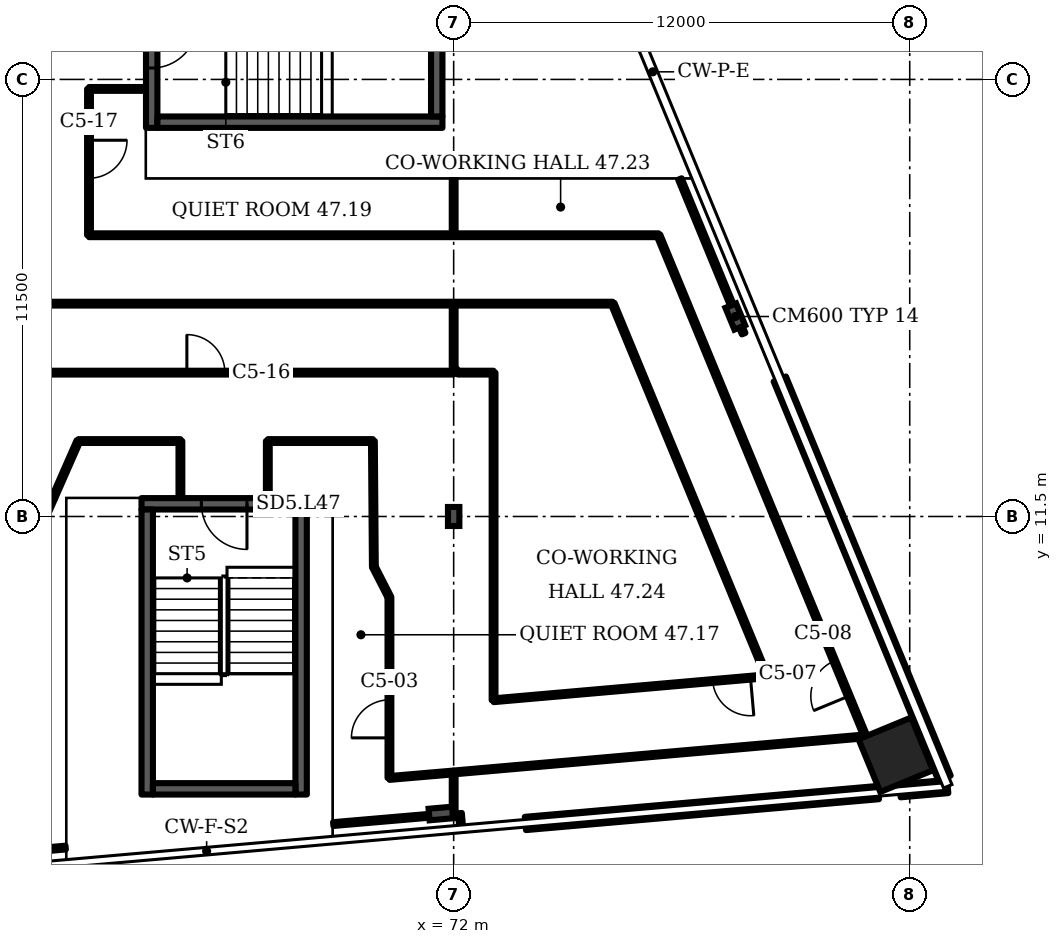
"""IFC4 building model, lengths in metres.
Left out: names, types, materials, properties, quantities, classifications, styles, units other than length and angle.
Written with IfcOpenShell. Run it as: python <this file> out.ifc"""

import sys

from ifc_helpers import new_model, si_unit, direction, frame, frame_2d, origin, origin_2d, place, context, subcontext, project, spatial, rectangle, i_section, extrude, element, fill, save


model = new_model("IFC4")
c1 = context("Model", 3, precision=1e-05, world=origin(), true_north=direction((0.0, 1.0)))
c2 = subcontext(c1, "Body", "Model", "MODEL_VIEW")
j1 = project(units=[si_unit("LENGTHUNIT", "METRE"), si_unit("PLANEANGLEUNIT", "RADIAN")], contexts=[c1])
p1 = place(None, origin())
s1 = spatial("IfcSite", under=j1, at=p1, CompositionType="ELEMENT")
p2 = place(p1, origin())
s2 = spatial("IfcBuilding", under=s1, at=p2, CompositionType="ELEMENT")
p3 = place(p2, frame((0.0, 0.0, 191.5)))
s3 = spatial("IfcBuildingStorey", under=s2, at=p3, CompositionType="ELEMENT", Elevation=191.5)
p4 = place(p3, frame((83.633, 5.231, 0.0), z_axis=(0.0, 0.0, 1.0), x_axis=(-0.381602, 0.924325, 0.0)))
e1 = element("IfcColumn", 1, at=p4, inside=s3, PredefinedType="COLUMN", context=c2, shape_type="SweptSolid", body=[
    extrude(rectangle(XDim=1.5, YDim=1.5, at=origin_2d()), origin(), (0.0, 0.0, 1.0), 3.6),
])
for number, where, z_axis, x_axis in (
    (2, (71.662, 3.685, 0.0), (0.0, 0.0, 1.0), (0.087, -0.996, 0.0)),
    (3, (79.41, 16.762, 0.0), (0.0, 0.0, 1.0), (0.924, 0.382, 0.0)),
):
    element("IfcColumn", number, at=place(p3, frame(where, z_axis=z_axis, x_axis=x_axis)), inside=s3, PredefinedType="COLUMN", context=c2, shape_type="SweptSolid", body=[
        extrude(i_section(OverallWidth=0.305, OverallDepth=0.62, WebThickness=0.021, FlangeThickness=0.04, FilletRadius=0.027, at=origin_2d()), origin(), (0.0, 0.0, 1.0), 3.6),
    ])
p5 = place(p3, frame((72.0, 11.5, 0.0), z_axis=(0.0, 0.0, 1.0), x_axis=(1.0, 0.0, 0.0)))
e4 = element("IfcColumn", 4, at=p5, inside=s3, PredefinedType="COLUMN", context=c2, shape_type="SweptSolid", body=[
    extrude(i_section(OverallWidth=0.3, OverallDepth=0.5, WebThickness=0.014, FlangeThickness=0.028, FilletRadius=0.027, at=origin_2d()), origin(), (0.0, 0.0, 1.0), 3.6),
])
p6 = place(p3, frame((73.887, 3.423, 0.0), z_axis=(0.0, 0.0, 1.0), x_axis=(0.996197, 0.087145, 0.0)))
e5 = element("IfcWall", 5, at=p6, inside=s3, PredefinedType="SOLIDWALL", context=c2, shape_type="SweptSolid", body=[
    extrude(rectangle(XDim=9.323, YDim=0.35, at=frame_2d((4.662, 0.0))), origin(), (0.0, 0.0, 1.0), 1.0),
])
p7 = place(p3, frame((83.745, 4.285, 0.0), z_axis=(0.0, 0.0, 1.0), x_axis=(0.996198, 0.087148, 0.0)))
e6 = element("IfcWall", 6, at=p7, inside=s3, PredefinedType="SOLIDWALL", context=c2, shape_type="SweptSolid", body=[
    extrude(rectangle(XDim=1.261, YDim=0.35, at=frame_2d((0.63, 0.0))), origin(), (0.0, 0.0, 1.0), 1.0),
])
p8 = place(p3, frame((84.916, 4.616, 0.0), z_axis=(0.0, 0.0, 1.0), x_axis=(-0.381598, 0.924328, 0.0)))
e7 = element("IfcWall", 7, at=p8, inside=s3, PredefinedType="SOLIDWALL", context=c2, shape_type="SweptSolid", body=[
    extrude(rectangle(XDim=11.361, YDim=0.35, at=frame_2d((5.68, 0.0))), origin(), (0.0, 0.0, 1.0), 1.0),
])
p9 = place(p3, frame((63.786, 11.834, 0.0), z_axis=(0.0, 0.0, 1.0), x_axis=(1.0, 0.0, 0.0)))
e8 = element("IfcWall", 8, at=p9, inside=s3, PredefinedType="SHEAR", context=c2, shape_type="SweptSolid", body=[
    extrude(rectangle(XDim=4.35, YDim=0.3, at=frame_2d((2.175, 0.0))), origin(), (0.0, 0.0, 1.0), 3.2),
])
p10 = place(p9, frame((1.575, 0.0, 0.0)))
e9 = element("IfcOpeningElement", 9, at=p10, cuts=e8, PredefinedType="OPENING", context=c2, shape_type="SweptSolid", body=[
    extrude(rectangle(XDim=1.2, YDim=2.1, at=frame_2d((0.6, 1.05))), frame((0.0, 0.16, 0.0), z_axis=(0.0, -1.0, 0.0), x_axis=(1.0, 0.0, 0.0)), (0.0, 0.0, 1.0), 0.32),
])
p11 = place(p3, frame((64.055, 21.725, 0.0), z_axis=(0.0, 0.0, 1.0), x_axis=(0.0, 1.0, 0.0)))
e10 = element("IfcWall", 10, at=p11, inside=s3, PredefinedType="SHEAR", context=c2, shape_type="SweptSolid", body=[
    extrude(rectangle(XDim=4.35, YDim=0.3, at=frame_2d((2.175, 0.0))), origin(), (0.0, 0.0, 1.0), 3.2),
])
p12 = place(p11, frame((1.575, 0.0, 0.0)))
e11 = element("IfcOpeningElement", 11, at=p12, cuts=e10, PredefinedType="OPENING", context=c2, shape_type="SweptSolid", body=[
    extrude(rectangle(XDim=1.2, YDim=2.1, at=frame_2d((0.6, 1.05))), frame((0.0, 0.16, 0.0), z_axis=(0.0, -1.0, 0.0), x_axis=(1.0, 0.0, 0.0)), (0.0, 0.0, 1.0), 0.32),
])
p13 = place(p3, frame((46.0, 1.41, 0.0), z_axis=(0.0, 0.0, 1.0), x_axis=(0.996213, 0.086958, 0.0)))
e12 = element("IfcWall", 12, at=p13, inside=s3, PredefinedType="PARTITIONING", context=c2, shape_type="SweptSolid", body=[
    extrude(rectangle(XDim=15.852, YDim=0.1, at=frame_2d((7.926, 0.0))), origin(), (0.0, 0.0, 1.0), 2.58),
])
p14 = place(p3, frame((59.0, 15.285, 0.0), z_axis=(0.0, 0.0, 1.0), x_axis=(1.0, 0.0, 0.0)))
e13 = element("IfcWall", 13, at=p14, inside=s3, PredefinedType="PARTITIONING", context=c2, shape_type="SweptSolid", body=[
    extrude(rectangle(XDim=13.0, YDim=0.1, at=frame_2d((6.5, 0.0))), origin(), (0.0, 0.0, 1.0), 3.2),
])
p15 = place(p14, frame((5.98, 0.0, 0.0)))
e14 = element("IfcOpeningElement", 14, at=p15, cuts=e13, PredefinedType="OPENING", context=c2, shape_type="SweptSolid", body=[
    extrude(rectangle(XDim=1.0, YDim=2.1, at=frame_2d((0.5, 1.05))), frame((0.0, 0.06, 0.0), z_axis=(0.0, -1.0, 0.0), x_axis=(1.0, 0.0, 0.0)), (0.0, 0.0, 1.0), 0.12),
])
p16 = place(p3, frame((60.31, 9.375, 0.0), z_axis=(0.0, 0.0, 1.0), x_axis=(0.404668, 0.914459, 0.0)))
e15 = element("IfcWall", 15, at=p16, inside=s3, PredefinedType="PARTITIONING", context=c2, shape_type="SweptSolid", body=[
    extrude(rectangle(XDim=2.854, YDim=0.1, at=frame_2d((1.427, 0.0))), origin(), (0.0, 0.0, 1.0), 3.2),
])
p17 = place(p3, frame((60.605, 17.1, 0.0), z_axis=(0.0, 0.0, 1.0), x_axis=(1.0, 0.0, 0.0)))
e16 = element("IfcWall", 16, at=p17, inside=s3, PredefinedType="PARTITIONING", context=c2, shape_type="SweptSolid", body=[
    extrude(rectangle(XDim=15.58, YDim=0.1, at=frame_2d((7.79, 0.0))), origin(), (0.0, 0.0, 1.0), 3.2),
])
p18 = place(p3, frame((61.465, 11.985, 0.0), z_axis=(0.0, 0.0, 1.0), x_axis=(0.402692, 0.915331, 0.0)))
e17 = element("IfcWall", 17, at=p18, inside=s3, PredefinedType="PARTITIONING", context=c2, shape_type="SweptSolid", body=[
    extrude(rectangle(XDim=1.639, YDim=0.1, at=frame_2d((0.819, 0.0))), origin(), (0.0, 0.0, 1.0), 3.2),
])
p19 = place(p3, frame((62.125, 13.485, 0.0), z_axis=(0.0, 0.0, 1.0), x_axis=(1.0, 0.0, 0.0)))
e18 = element("IfcWall", 18, at=p19, inside=s3, PredefinedType="PARTITIONING", context=c2, shape_type="SweptSolid", body=[
    extrude(rectangle(XDim=2.685, YDim=0.1, at=frame_2d((1.343, 0.0))), origin(), (0.0, 0.0, 1.0), 3.2),
])
p20 = place(p3, frame((62.405, 18.9, 0.0), z_axis=(0.0, 0.0, 1.0), x_axis=(0.0, 1.0, 0.0)))
e19 = element("IfcWall", 19, at=p20, inside=s3, PredefinedType="PARTITIONING", context=c2, shape_type="SweptSolid", body=[
    extrude(rectangle(XDim=3.85, YDim=0.1, at=frame_2d((1.925, 0.0))), origin(), (0.0, 0.0, 1.0), 3.2),
])
p21 = place(p20, frame((1.5, 0.0, 0.0)))
e20 = element("IfcOpeningElement", 20, at=p21, cuts=e19, PredefinedType="OPENING", context=c2, shape_type="SweptSolid", body=[
    extrude(rectangle(XDim=1.0, YDim=2.1, at=frame_2d((0.5, 1.05))), frame((0.0, 0.06, 0.0), z_axis=(0.0, -1.0, 0.0), x_axis=(1.0, 0.0, 0.0)), (0.0, 0.0, 1.0), 0.12),
])
p22 = place(p3, frame((62.405, 18.9, 0.0), z_axis=(0.0, 0.0, 1.0), x_axis=(1.0, 0.0, 0.0)))
e21 = element("IfcWall", 21, at=p22, inside=s3, PredefinedType="PARTITIONING", context=c2, shape_type="SweptSolid", body=[
    extrude(rectangle(XDim=14.985, YDim=0.1, at=frame_2d((7.492, 0.0))), origin(), (0.0, 0.0, 1.0), 3.2),
])
p23 = place(p3, frame((62.405, 22.75, 0.0), z_axis=(0.0, 0.0, 1.0), x_axis=(1.0, 0.0, 0.0)))
e22 = element("IfcWall", 22, at=p23, inside=s3, PredefinedType="PARTITIONING", context=c2, shape_type="SweptSolid", body=[
    extrude(rectangle(XDim=1.479, YDim=0.1, at=frame_2d((0.74, 0.0))), origin(), (0.0, 0.0, 1.0), 3.2),
])
for number, where, z_axis, x_axis in (
    (23, (64.81, 12.004, 0.0), (0.0, 0.0, 1.0), (0.0, 1.0, 0.0)),
    (24, (67.11, 12.004, 0.0), (0.0, 0.0, 1.0), (0.0, 1.0, 0.0)),
):
    element("IfcWall", number, at=place(p3, frame(where, z_axis=z_axis, x_axis=x_axis)), inside=s3, PredefinedType="PARTITIONING", context=c2, shape_type="SweptSolid", body=[
        extrude(rectangle(XDim=1.481, YDim=0.1, at=frame_2d((0.741, 0.0))), origin(), (0.0, 0.0, 1.0), 3.2),
    ])
p24 = place(p3, frame((67.11, 13.485, 0.0), z_axis=(0.0, 0.0, 1.0), x_axis=(1.0, 0.0, 0.0)))
e25 = element("IfcWall", 25, at=p24, inside=s3, PredefinedType="PARTITIONING", context=c2, shape_type="SweptSolid", body=[
    extrude(rectangle(XDim=2.765, YDim=0.1, at=frame_2d((1.382, 0.0))), origin(), (0.0, 0.0, 1.0), 3.2),
])
p25 = place(p3, frame((68.831, 3.407, 0.0), z_axis=(0.0, 0.0, 1.0), x_axis=(0.996308, 0.085898, 0.0)))
e26 = element("IfcWall", 26, at=p25, inside=s3, PredefinedType="PARTITIONING", context=c2, shape_type="SweptSolid", body=[
    extrude(rectangle(XDim=3.18, YDim=0.1, at=frame_2d((1.59, 0.0))), origin(), (0.0, 0.0, 1.0), 2.58),
])
p26 = place(p3, frame((69.9, 10.175, 0.0), z_axis=(0.0, 0.0, 1.0), x_axis=(-0.007523, 0.999969, 0.0)))
e27 = element("IfcWall", 27, at=p26, inside=s3, PredefinedType="PARTITIONING", context=c2, shape_type="SweptSolid", body=[
    extrude(rectangle(XDim=3.31, YDim=0.1, at=frame_2d((1.655, 0.0))), origin(), (0.0, 0.0, 1.0), 3.2),
])
p27 = place(p3, frame((70.31, 4.62, 0.0), z_axis=(0.0, 0.0, 1.0), x_axis=(0.996348, 0.085356, 0.0)))
e28 = element("IfcWall", 28, at=p27, inside=s3, PredefinedType="PARTITIONING", context=c2, shape_type="SweptSolid", body=[
    extrude(rectangle(XDim=1.696, YDim=0.1, at=frame_2d((0.848, 0.0))), origin(), (0.0, 0.0, 1.0), 3.2),
])
p28 = place(p3, frame((70.31, 9.375, 0.0), z_axis=(0.0, 0.0, 1.0), x_axis=(-0.456208, 0.889877, 0.0)))
e29 = element("IfcWall", 29, at=p28, inside=s3, PredefinedType="PARTITIONING", context=c2, shape_type="SweptSolid", body=[
    extrude(rectangle(XDim=0.899, YDim=0.1, at=frame_2d((0.45, 0.0))), origin(), (0.0, 0.0, 1.0), 3.2),
])
p29 = place(p3, frame((70.31, 4.62, 0.0), z_axis=(0.0, 0.0, 1.0), x_axis=(0.0, 1.0, 0.0)))
e30 = element("IfcWall", 30, at=p29, inside=s3, PredefinedType="PARTITIONING", context=c2, shape_type="SweptSolid", body=[
    extrude(rectangle(XDim=4.755, YDim=0.1, at=frame_2d((2.377, 0.0))), origin(), (0.0, 0.0, 1.0), 3.2),
])
p30 = place(p29, frame((1.055, 0.0, 0.0)))
e31 = element("IfcOpeningElement", 31, at=p30, cuts=e30, PredefinedType="OPENING", context=c2, shape_type="SweptSolid", body=[
    extrude(rectangle(XDim=1.0, YDim=2.1, at=frame_2d((0.5, 1.05))), frame((0.0, 0.06, 0.0), z_axis=(0.0, -1.0, 0.0), x_axis=(1.0, 0.0, 0.0)), (0.0, 0.0, 1.0), 0.12),
])
p31 = place(p3, frame((72.0, 3.68, 0.0), z_axis=(0.0, 0.0, 1.0), x_axis=(0.0, 1.0, 0.0)))
e32 = element("IfcWall", 32, at=p31, inside=s3, PredefinedType="PARTITIONING", context=c2, shape_type="SweptSolid", body=[
    extrude(rectangle(XDim=1.085, YDim=0.1, at=frame_2d((0.542, 0.0))), origin(), (0.0, 0.0, 1.0), 3.2),
])
p32 = place(p3, frame((72.0, 4.765, 0.0), z_axis=(0.0, 0.0, 1.0), x_axis=(0.996178, 0.087362, 0.0)))
e33 = element("IfcWall", 33, at=p32, inside=s3, PredefinedType="PARTITIONING", context=c2, shape_type="SweptSolid", body=[
    extrude(rectangle(XDim=10.876, YDim=0.1, at=frame_2d((5.438, 0.0))), origin(), (0.0, 0.0, 1.0), 3.2),
])
p33 = place(p3, frame((72.0, 15.285, 0.0), z_axis=(0.0, 0.0, 1.0), x_axis=(0.0, 1.0, 0.0)))
e34 = element("IfcWall", 34, at=p33, inside=s3, PredefinedType="PARTITIONING", context=c2, shape_type="SweptSolid", body=[
    extrude(rectangle(XDim=1.815, YDim=0.1, at=frame_2d((0.908, 0.0))), origin(), (0.0, 0.0, 1.0), 3.2),
])
p34 = place(p3, frame((72.0, 18.9, 0.0), z_axis=(0.0, 0.0, 1.0), x_axis=(0.0, 1.0, 0.0)))
e35 = element("IfcWall", 35, at=p34, inside=s3, PredefinedType="PARTITIONING", context=c2, shape_type="SweptSolid", body=[
    extrude(rectangle(XDim=1.48, YDim=0.1, at=frame_2d((0.74, 0.0))), origin(), (0.0, 0.0, 1.0), 3.2),
])
p35 = place(p3, frame((72.11, 15.285, 0.0), z_axis=(0.0, 0.0, 1.0), x_axis=(1.0, 0.0, 0.0)))
e36 = element("IfcWall", 36, at=p35, inside=s3, PredefinedType="PARTITIONING", context=c2, shape_type="SweptSolid", body=[
    extrude(rectangle(XDim=0.94, YDim=0.1, at=frame_2d((0.47, 0.0))), origin(), (0.0, 0.0, 1.0), 3.2),
])
p36 = place(p3, frame((72.11, 15.285, 0.0), z_axis=(0.0, 0.0, 1.0), x_axis=(-0.675728, 0.737158, 0.0)))
e37 = element("IfcWall", 37, at=p36, inside=s3, PredefinedType="PARTITIONING", context=c2, shape_type="SweptSolid", body=[
    extrude(rectangle(XDim=0.163, YDim=0.1, at=frame_2d((0.082, 0.0))), origin(), (0.0, 0.0, 1.0), 3.2),
])
p37 = place(p3, frame((72.198, 3.3, 0.0), z_axis=(0.0, 0.0, 1.0), x_axis=(-0.083759, 0.996486, 0.0)))
e38 = element("IfcWall", 38, at=p37, inside=s3, PredefinedType="PARTITIONING", context=c2, shape_type="SweptSolid", body=[
    extrude(rectangle(XDim=0.396, YDim=0.1, at=frame_2d((0.198, 0.0))), origin(), (0.0, 0.0, 1.0), 3.2),
])
p38 = place(p3, frame((73.05, 6.665, 0.0), z_axis=(0.0, 0.0, 1.0), x_axis=(0.996183, 0.087331, 0.0)))
e39 = element("IfcWall", 39, at=p38, inside=s3, PredefinedType="PARTITIONING", context=c2, shape_type="SweptSolid", body=[
    extrude(rectangle(XDim=7.213, YDim=0.1, at=frame_2d((3.606, 0.0))), origin(), (0.0, 0.0, 1.0), 3.2),
])
p39 = place(p38, frame((5.786, 0.0, 0.0)))
e40 = element("IfcOpeningElement", 40, at=p39, cuts=e39, PredefinedType="OPENING", context=c2, shape_type="SweptSolid", body=[
    extrude(rectangle(XDim=1.0, YDim=2.1, at=frame_2d((0.5, 1.05))), frame((0.0, 0.06, 0.0), z_axis=(0.0, -1.0, 0.0), x_axis=(1.0, 0.0, 0.0)), (0.0, 0.0, 1.0), 0.12),
])
p40 = place(p3, frame((73.05, 6.665, 0.0), z_axis=(0.0, 0.0, 1.0), x_axis=(0.0, 1.0, 0.0)))
e41 = element("IfcWall", 41, at=p40, inside=s3, PredefinedType="PARTITIONING", context=c2, shape_type="SweptSolid", body=[
    extrude(rectangle(XDim=8.62, YDim=0.1, at=frame_2d((4.31, 0.0))), origin(), (0.0, 0.0, 1.0), 3.2),
])
p41 = place(p3, frame((79.63, 16.31, 0.0), z_axis=(0.0, 0.0, 1.0), x_axis=(-0.380933, 0.9246, 0.0)))
e42 = element("IfcWall", 42, at=p41, inside=s3, PredefinedType="PARTITIONING", context=c2, shape_type="SweptSolid", body=[
    extrude(rectangle(XDim=4.402, YDim=0.1, at=frame_2d((2.201, 0.0))), origin(), (0.0, 0.0, 1.0), 2.58),
])
p42 = place(p3, frame((80.235, 7.295, 0.0), z_axis=(0.0, 0.0, 1.0), x_axis=(-0.381768, 0.924261, 0.0)))
e43 = element("IfcWall", 43, at=p42, inside=s3, PredefinedType="PARTITIONING", context=c2, shape_type="SweptSolid", body=[
    extrude(rectangle(XDim=10.609, YDim=0.1, at=frame_2d((5.304, 0.0))), origin(), (0.0, 0.0, 1.0), 3.2),
])
p43 = place(p3, frame((82.835, 5.715, 0.0), z_axis=(0.0, 0.0, 1.0), x_axis=(-0.381709, 0.924279, 0.0)))
e44 = element("IfcWall", 44, at=p43, inside=s3, PredefinedType="PARTITIONING", context=c2, shape_type="SweptSolid", body=[
    extrude(rectangle(XDim=14.265, YDim=0.1, at=frame_2d((7.132, 0.0))), origin(), (0.0, 0.0, 1.0), 3.2),
])
p44 = place(p43, frame((1.146, 0.0, 0.0)))
e45 = element("IfcOpeningElement", 45, at=p44, cuts=e44, PredefinedType="OPENING", context=c2, shape_type="SweptSolid", body=[
    extrude(rectangle(XDim=1.0, YDim=2.1, at=frame_2d((0.5, 1.05))), frame((0.0, 0.06, 0.0), z_axis=(0.0, -1.0, 0.0), x_axis=(1.0, 0.0, 0.0)), (0.0, 0.0, 1.0), 0.12),
])
for number, where, z_axis, x_axis in (
    (46, (63.936, 4.184, 0.0), (0.0, 0.0, 1.0), (0.0, 1.0, 0.0)),
    (47, (67.986, 4.184, 0.0), (0.0, 0.0, 1.0), (0.0, 1.0, 0.0)),
):
    element("IfcWall", number, at=place(p3, frame(where, z_axis=z_axis, x_axis=x_axis)), inside=s3, PredefinedType="SHEAR", context=c2, shape_type="SweptSolid", body=[
        extrude(rectangle(XDim=7.5, YDim=0.3, at=frame_2d((3.75, 0.0))), origin(), (0.0, 0.0, 1.0), 3.2),
    ])
p45 = place(p3, frame((64.086, 4.334, 0.0), z_axis=(0.0, 0.0, 1.0), x_axis=(1.0, 0.0, 0.0)))
e48 = element("IfcWall", 48, at=p45, inside=s3, PredefinedType="SHEAR", context=c2, shape_type="SweptSolid", body=[
    extrude(rectangle(XDim=3.75, YDim=0.3, at=frame_2d((1.875, 0.0))), origin(), (0.0, 0.0, 1.0), 3.2),
])
p46 = place(p3, frame((64.205, 21.875, 0.0), z_axis=(0.0, 0.0, 1.0), x_axis=(1.0, 0.0, 0.0)))
e49 = element("IfcWall", 49, at=p46, inside=s3, PredefinedType="SHEAR", context=c2, shape_type="SweptSolid", body=[
    extrude(rectangle(XDim=7.5, YDim=0.3, at=frame_2d((3.75, 0.0))), origin(), (0.0, 0.0, 1.0), 3.2),
])
p47 = place(p3, frame((71.555, 22.025, 0.0), z_axis=(0.0, 0.0, 1.0), x_axis=(0.0, 1.0, 0.0)))
e50 = element("IfcWall", 50, at=p47, inside=s3, PredefinedType="SHEAR", context=c2, shape_type="SweptSolid", body=[
    extrude(rectangle(XDim=3.75, YDim=0.3, at=frame_2d((1.875, 0.0))), origin(), (0.0, 0.0, 1.0), 3.2),
])
p48 = place(p10, origin())
e51 = element("IfcDoor", 51, at=p48, inside=s3, OperationType="SINGLE_SWING_RIGHT", PredefinedType="DOOR", context=c2, shape_type="SweptSolid", body=[
    extrude(rectangle(XDim=1.2, YDim=2.1, at=frame_2d((0.6, 1.05))), frame((0.0, 0.025, 0.0), z_axis=(0.0, -1.0, 0.0), x_axis=(1.0, 0.0, 0.0)), (0.0, 0.0, 1.0), 0.05),
])
fill(e9, e51)
p49 = place(p12, origin())
e52 = element("IfcDoor", 52, at=p49, inside=s3, OperationType="SINGLE_SWING_RIGHT", PredefinedType="DOOR", context=c2, shape_type="SweptSolid", body=[
    extrude(rectangle(XDim=1.2, YDim=2.1, at=frame_2d((0.6, 1.05))), frame((0.0, 0.025, 0.0), z_axis=(0.0, -1.0, 0.0), x_axis=(1.0, 0.0, 0.0)), (0.0, 0.0, 1.0), 0.05),
])
fill(e11, e52)
p50 = place(p30, origin())
e53 = element("IfcDoor", 53, at=p50, inside=s3, OperationType="SINGLE_SWING_LEFT", PredefinedType="DOOR", context=c2, shape_type="SweptSolid", body=[
    extrude(rectangle(XDim=1.0, YDim=2.1, at=frame_2d((0.5, 1.05))), frame((0.0, 0.025, 0.0), z_axis=(0.0, -1.0, 0.0), x_axis=(1.0, 0.0, 0.0)), (0.0, 0.0, 1.0), 0.05),
])
fill(e31, e53)
p51 = place(p39, origin())
e54 = element("IfcDoor", 54, at=p51, inside=s3, OperationType="SINGLE_SWING_RIGHT", PredefinedType="DOOR", context=c2, shape_type="SweptSolid", body=[
    extrude(rectangle(XDim=1.0, YDim=2.1, at=frame_2d((0.5, 1.05))), frame((0.0, 0.025, 0.0), z_axis=(0.0, -1.0, 0.0), x_axis=(1.0, 0.0, 0.0)), (0.0, 0.0, 1.0), 0.05),
])
fill(e40, e54)
p52 = place(p44, origin())
e55 = element("IfcDoor", 55, at=p52, inside=s3, OperationType="SINGLE_SWING_LEFT", PredefinedType="DOOR", context=c2, shape_type="SweptSolid", body=[
    extrude(rectangle(XDim=1.0, YDim=2.1, at=frame_2d((0.5, 1.05))), frame((0.0, 0.025, 0.0), z_axis=(0.0, -1.0, 0.0), x_axis=(1.0, 0.0, 0.0)), (0.0, 0.0, 1.0), 0.05),
])
fill(e45, e55)
p53 = place(p15, origin())
e56 = element("IfcDoor", 56, at=p53, inside=s3, OperationType="SINGLE_SWING_LEFT", PredefinedType="DOOR", context=c2, shape_type="SweptSolid", body=[
    extrude(rectangle(XDim=1.0, YDim=2.1, at=frame_2d((0.5, 1.05))), frame((0.0, 0.025, 0.0), z_axis=(0.0, -1.0, 0.0), x_axis=(1.0, 0.0, 0.0)), (0.0, 0.0, 1.0), 0.05),
])
fill(e14, e56)
p54 = place(p21, origin())
e57 = element("IfcDoor", 57, at=p54, inside=s3, OperationType="SINGLE_SWING_RIGHT", PredefinedType="DOOR", context=c2, shape_type="SweptSolid", body=[
    extrude(rectangle(XDim=1.0, YDim=2.1, at=frame_2d((0.5, 1.05))), frame((0.0, 0.025, 0.0), z_axis=(0.0, -1.0, 0.0), x_axis=(1.0, 0.0, 0.0)), (0.0, 0.0, 1.0), 0.05),
])
fill(e20, e57)
save(model, sys.argv[1])
